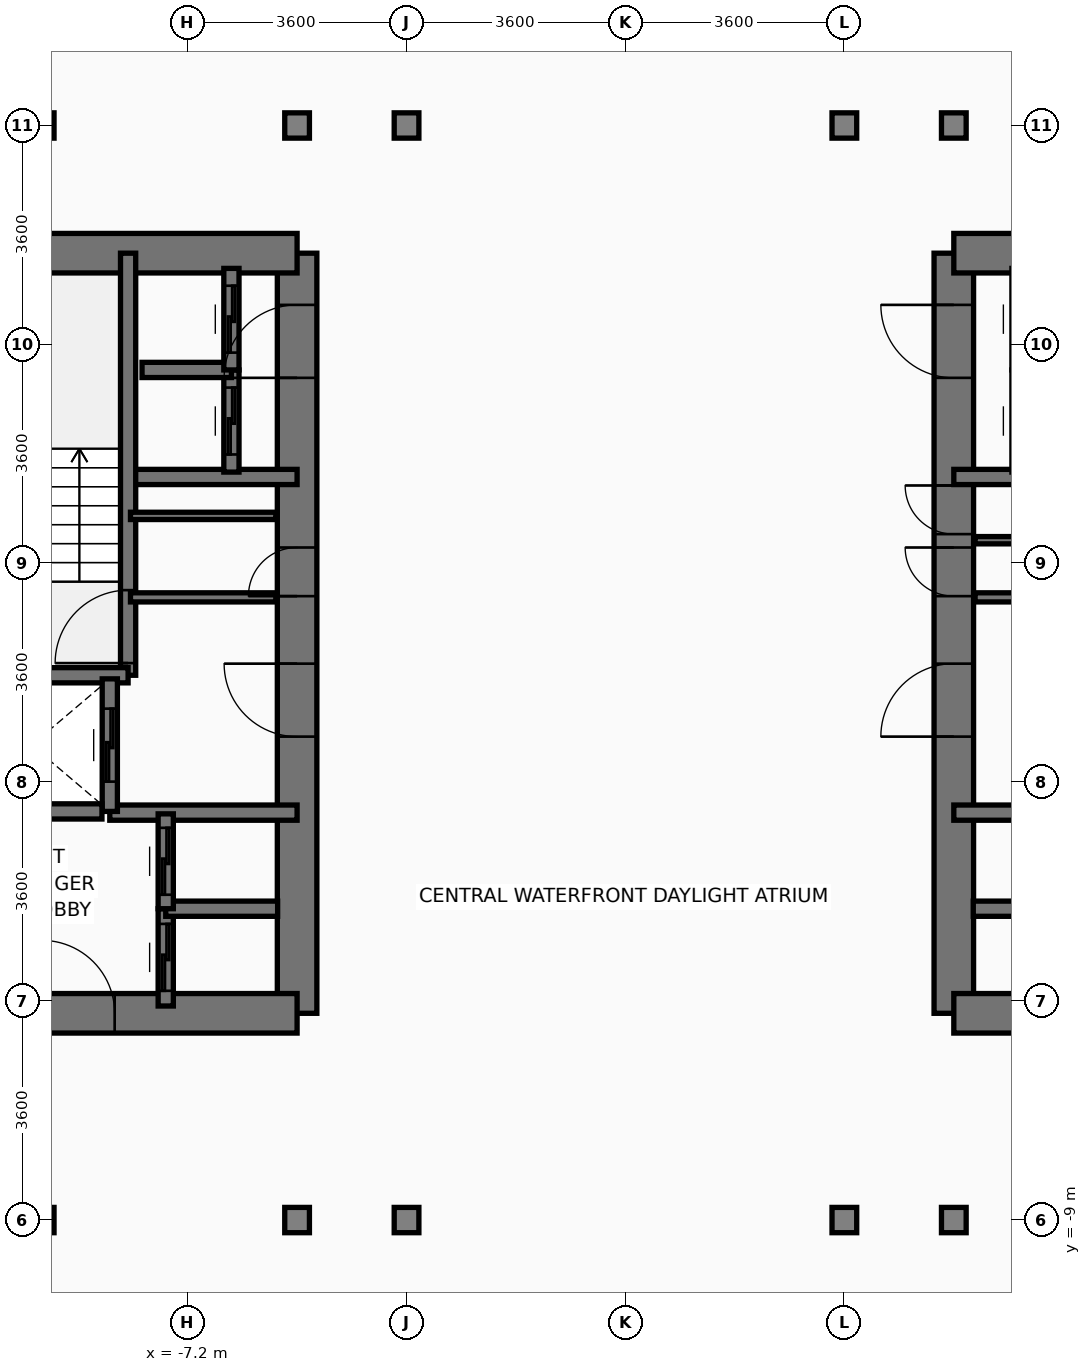
"""IFC4 building model, lengths in metres.
Left out: names, types, materials, properties, quantities, classifications, styles, units other than length and angle.
Written with IfcOpenShell. Run it as: python <this file> out.ifc"""

import sys

from ifc_helpers import new_model, si_unit, direction, frame, frame_2d, origin, origin_2d, place, context, subcontext, project, spatial, rectangle, i_section, extrude, source, transform, mapped, element, fill, save


model = new_model("IFC4")
c1 = context("Model", 3, precision=1e-05, world=origin(), true_north=direction((0.0, 1.0)))
c2 = subcontext(c1, "Body", "Model", "MODEL_VIEW")
j1 = project(units=[si_unit("LENGTHUNIT", "METRE"), si_unit("PLANEANGLEUNIT", "RADIAN")], contexts=[c1])
p1 = place(None, origin())
s1 = spatial("IfcSite", under=j1, at=p1, CompositionType="ELEMENT")
p2 = place(p1, origin())
s2 = spatial("IfcBuilding", under=s1, at=p2, CompositionType="ELEMENT")
p3 = place(p2, origin())
s3 = spatial("IfcBuildingStorey", under=s2, at=p3, CompositionType="ELEMENT", Elevation=0.0)
m1 = source(origin(), c2, "Body", "SweptSolid", [
    extrude(i_section(OverallWidth=0.406, OverallDepth=0.416, WebThickness=0.024, FlangeThickness=0.039, at=origin_2d()), origin(), (0.0, 0.0, 1.0), 5.15),
])
for number, where, z_axis, x_axis in (
    (1, (-9.6, -9.0, 0.0), (0.0, 0.0, 1.0), (1.0, 0.0, 0.0)),
    (2, (-9.6, 9.0, 0.0), (0.0, 0.0, 1.0), (1.0, 0.0, 0.0)),
    (3, (-5.4, -9.0, 0.0), (0.0, 0.0, 1.0), (1.0, 0.0, 0.0)),
    (4, (-5.4, 9.0, 0.0), (0.0, 0.0, 1.0), (1.0, 0.0, 0.0)),
    (5, (-3.6, -9.0, 0.0), (0.0, 0.0, 1.0), (1.0, 0.0, 0.0)),
    (6, (-3.6, 9.0, 0.0), (0.0, 0.0, 1.0), (1.0, 0.0, 0.0)),
    (7, (3.6, -9.0, 0.0), (0.0, 0.0, 1.0), (1.0, 0.0, 0.0)),
    (8, (3.6, 9.0, 0.0), (0.0, 0.0, 1.0), (1.0, 0.0, 0.0)),
    (9, (5.4, -9.0, 0.0), (0.0, 0.0, 1.0), (1.0, 0.0, 0.0)),
    (10, (5.4, 9.0, 0.0), (0.0, 0.0, 1.0), (1.0, 0.0, 0.0)),
):
    element("IfcColumn", number, at=place(p3, frame(where, z_axis=z_axis, x_axis=x_axis)), inside=s3, PredefinedType="COLUMN", context=c2, shape_type="MappedRepresentation", body=[
        mapped(m1, transform((0.0, 0.0, 0.0), x_axis=(1.0, 0.0, 0.0), y_axis=(0.0, 1.0, 0.0), z_axis=(0.0, 0.0, 1.0), scale=1.0)),
    ])
p4 = place(p3, frame((-5.4, -5.6, 0.0), z_axis=(0.0, 0.0, 1.0), x_axis=(0.0, 1.0, 0.0)))
e11 = element("IfcWall", 11, at=p4, inside=s3, PredefinedType="SHEAR", context=c2, shape_type="SweptSolid", body=[
    extrude(rectangle(XDim=12.5, YDim=0.65, at=frame_2d((6.25, 0.0))), origin(), (0.0, 0.0, 1.0), 5.15),
])
p5 = place(p4, frame((4.55, 0.0, 0.0)))
e12 = element("IfcOpeningElement", 12, at=p5, cuts=e11, PredefinedType="OPENING", context=c2, shape_type="SweptSolid", body=[
    extrude(rectangle(XDim=1.2, YDim=2.2, at=frame_2d((0.6, 1.1))), frame((0.0, 0.335, 0.0), z_axis=(0.0, -1.0, 0.0), x_axis=(1.0, 0.0, 0.0)), (0.0, 0.0, 1.0), 0.67),
])
p6 = place(p4, frame((10.45, 0.0, 0.0)))
e13 = element("IfcOpeningElement", 13, at=p6, cuts=e11, PredefinedType="OPENING", context=c2, shape_type="SweptSolid", body=[
    extrude(rectangle(XDim=1.2, YDim=2.2, at=frame_2d((0.6, 1.1))), frame((0.0, 0.335, 0.0), z_axis=(0.0, -1.0, 0.0), x_axis=(1.0, 0.0, 0.0)), (0.0, 0.0, 1.0), 0.67),
])
p7 = place(p4, frame((6.86, 0.0, 0.0)))
e14 = element("IfcOpeningElement", 14, at=p7, cuts=e11, PredefinedType="OPENING", context=c2, shape_type="SweptSolid", body=[
    extrude(rectangle(XDim=0.8, YDim=2.1, at=frame_2d((0.4, 1.05))), frame((0.0, 0.335, 0.0), z_axis=(0.0, -1.0, 0.0), x_axis=(1.0, 0.0, 0.0)), (0.0, 0.0, 1.0), 0.67),
])
p8 = place(p3, frame((-11.381, 6.9, 0.0), z_axis=(0.0, 0.0, 1.0), x_axis=(1.0, 0.0, 0.0)))
e15 = element("IfcWall", 15, at=p8, inside=s3, PredefinedType="SHEAR", context=c2, shape_type="SweptSolid", body=[
    extrude(rectangle(XDim=5.981, YDim=0.65, at=frame_2d((2.991, 0.0))), origin(), (0.0, 0.0, 1.0), 5.15),
])
p9 = place(p3, frame((-13.2, -5.6, 0.0), z_axis=(0.0, 0.0, 1.0), x_axis=(1.0, 0.0, 0.0)))
e16 = element("IfcWall", 16, at=p9, inside=s3, PredefinedType="SHEAR", context=c2, shape_type="SweptSolid", body=[
    extrude(rectangle(XDim=7.8, YDim=0.65, at=frame_2d((3.9, 0.0))), origin(), (0.0, 0.0, 1.0), 5.15),
])
p10 = place(p9, frame((3.6, 0.0, 0.0)))
e17 = element("IfcOpeningElement", 17, at=p10, cuts=e16, PredefinedType="OPENING", context=c2, shape_type="SweptSolid", body=[
    extrude(rectangle(XDim=1.2, YDim=2.2, at=frame_2d((0.6, 1.1))), frame((0.0, 0.335, 0.0), z_axis=(0.0, -1.0, 0.0), x_axis=(1.0, 0.0, 0.0)), (0.0, 0.0, 1.0), 0.67),
])
p11 = place(p3, frame((-8.18, 3.22, 0.0), z_axis=(0.0, 0.0, 1.0), x_axis=(1.0, 0.0, 0.0)))
e18 = element("IfcWall", 18, at=p11, inside=s3, PredefinedType="SOLIDWALL", context=c2, shape_type="SweptSolid", body=[
    extrude(rectangle(XDim=2.78, YDim=0.25, at=frame_2d((1.39, 0.0))), origin(), (0.0, 0.0, 1.0), 5.15),
])
p12 = place(p3, frame((-8.48, -2.3, 0.0), z_axis=(0.0, 0.0, 1.0), x_axis=(1.0, 0.0, 0.0)))
e19 = element("IfcWall", 19, at=p12, inside=s3, PredefinedType="SOLIDWALL", context=c2, shape_type="SweptSolid", body=[
    extrude(rectangle(XDim=3.08, YDim=0.25, at=frame_2d((1.54, 0.0))), origin(), (0.0, 0.0, 1.0), 5.15),
])
p13 = place(p3, frame((-8.179, -0.041, 0.0), z_axis=(0.0, 0.0, 1.0), x_axis=(0.0, 1.0, 0.0)))
e20 = element("IfcWall", 20, at=p13, inside=s3, PredefinedType="SOLIDWALL", context=c2, shape_type="SweptSolid", body=[
    extrude(rectangle(XDim=6.941, YDim=0.25, at=frame_2d((3.47, 0.0))), origin(), (0.0, 0.0, 1.0), 5.15),
])
p14 = place(p13, frame((0.2, 0.0, 0.0)))
e21 = element("IfcOpeningElement", 21, at=p14, cuts=e20, PredefinedType="OPENING", context=c2, shape_type="SweptSolid", body=[
    extrude(rectangle(XDim=1.2, YDim=2.2, at=frame_2d((0.6, 1.1))), frame((0.0, 0.135, 0.0), z_axis=(0.0, -1.0, 0.0), x_axis=(1.0, 0.0, 0.0)), (0.0, 0.0, 1.0), 0.27),
])
p15 = place(p3, frame((-11.381, -0.041, 0.0), z_axis=(0.0, 0.0, 1.0), x_axis=(1.0, 0.0, 0.0)))
e22 = element("IfcWall", 22, at=p15, inside=s3, PredefinedType="SOLIDWALL", context=c2, shape_type="SweptSolid", body=[
    extrude(rectangle(XDim=3.202, YDim=0.25, at=frame_2d((1.601, 0.0))), origin(), (0.0, 0.0, 1.0), 5.15),
])
p16 = place(p3, frame((5.4, -5.6, 0.0), z_axis=(0.0, 0.0, 1.0), x_axis=(0.0, 1.0, 0.0)))
e23 = element("IfcWall", 23, at=p16, inside=s3, PredefinedType="SHEAR", context=c2, shape_type="SweptSolid", body=[
    extrude(rectangle(XDim=12.5, YDim=0.65, at=frame_2d((6.25, 0.0))), origin(), (0.0, 0.0, 1.0), 5.15),
])
p17 = place(p16, frame((4.55, 0.0, 0.0)))
e24 = element("IfcOpeningElement", 24, at=p17, cuts=e23, PredefinedType="OPENING", context=c2, shape_type="SweptSolid", body=[
    extrude(rectangle(XDim=1.2, YDim=2.2, at=frame_2d((0.6, 1.1))), frame((0.0, 0.335, 0.0), z_axis=(0.0, -1.0, 0.0), x_axis=(1.0, 0.0, 0.0)), (0.0, 0.0, 1.0), 0.67),
])
p18 = place(p16, frame((10.45, 0.0, 0.0)))
e25 = element("IfcOpeningElement", 25, at=p18, cuts=e23, PredefinedType="OPENING", context=c2, shape_type="SweptSolid", body=[
    extrude(rectangle(XDim=1.2, YDim=2.2, at=frame_2d((0.6, 1.1))), frame((0.0, 0.335, 0.0), z_axis=(0.0, -1.0, 0.0), x_axis=(1.0, 0.0, 0.0)), (0.0, 0.0, 1.0), 0.67),
])
p19 = place(p16, frame((6.86, 0.0, 0.0)))
e26 = element("IfcOpeningElement", 26, at=p19, cuts=e23, PredefinedType="OPENING", context=c2, shape_type="SweptSolid", body=[
    extrude(rectangle(XDim=0.8, YDim=2.1, at=frame_2d((0.4, 1.05))), frame((0.0, 0.335, 0.0), z_axis=(0.0, -1.0, 0.0), x_axis=(1.0, 0.0, 0.0)), (0.0, 0.0, 1.0), 0.67),
])
p20 = place(p16, frame((7.88, 0.0, 0.0)))
e27 = element("IfcOpeningElement", 27, at=p20, cuts=e23, PredefinedType="OPENING", context=c2, shape_type="SweptSolid", body=[
    extrude(rectangle(XDim=0.8, YDim=2.1, at=frame_2d((0.4, 1.05))), frame((0.0, 0.335, 0.0), z_axis=(0.0, -1.0, 0.0), x_axis=(1.0, 0.0, 0.0)), (0.0, 0.0, 1.0), 0.67),
])
p21 = place(p3, frame((5.4, 6.9, 0.0), z_axis=(0.0, 0.0, 1.0), x_axis=(1.0, 0.0, 0.0)))
e28 = element("IfcWall", 28, at=p21, inside=s3, PredefinedType="SHEAR", context=c2, shape_type="SweptSolid", body=[
    extrude(rectangle(XDim=5.981, YDim=0.65, at=frame_2d((2.991, 0.0))), origin(), (0.0, 0.0, 1.0), 5.15),
])
p22 = place(p3, frame((5.4, -5.6, 0.0), z_axis=(0.0, 0.0, 1.0), x_axis=(1.0, 0.0, 0.0)))
e29 = element("IfcWall", 29, at=p22, inside=s3, PredefinedType="SHEAR", context=c2, shape_type="SweptSolid", body=[
    extrude(rectangle(XDim=7.8, YDim=0.65, at=frame_2d((3.9, 0.0))), origin(), (0.0, 0.0, 1.0), 5.15),
])
p23 = place(p22, frame((3.0, 0.0, 0.0)))
e30 = element("IfcOpeningElement", 30, at=p23, cuts=e29, PredefinedType="OPENING", context=c2, shape_type="SweptSolid", body=[
    extrude(rectangle(XDim=1.2, YDim=2.2, at=frame_2d((0.6, 1.1))), frame((0.0, 0.335, 0.0), z_axis=(0.0, -1.0, 0.0), x_axis=(1.0, 0.0, 0.0)), (0.0, 0.0, 1.0), 0.67),
])
p24 = place(p3, frame((5.4, 3.22, 0.0), z_axis=(0.0, 0.0, 1.0), x_axis=(1.0, 0.0, 0.0)))
e31 = element("IfcWall", 31, at=p24, inside=s3, PredefinedType="SOLIDWALL", context=c2, shape_type="SweptSolid", body=[
    extrude(rectangle(XDim=2.78, YDim=0.25, at=frame_2d((1.39, 0.0))), origin(), (0.0, 0.0, 1.0), 5.15),
])
p25 = place(p3, frame((5.4, -2.3, 0.0), z_axis=(0.0, 0.0, 1.0), x_axis=(1.0, 0.0, 0.0)))
e32 = element("IfcWall", 32, at=p25, inside=s3, PredefinedType="SOLIDWALL", context=c2, shape_type="SweptSolid", body=[
    extrude(rectangle(XDim=3.08, YDim=0.25, at=frame_2d((1.54, 0.0))), origin(), (0.0, 0.0, 1.0), 5.15),
])
p26 = place(p3, frame((-8.48, -2.28, 0.0), z_axis=(0.0, 0.0, 1.0), x_axis=(0.0, 1.0, 0.0)))
e33 = element("IfcWall", 33, at=p26, inside=s3, PredefinedType="SOLIDWALL", context=c2, shape_type="SweptSolid", body=[
    extrude(rectangle(XDim=2.18, YDim=0.25, at=frame_2d((1.09, 0.0))), origin(), (0.0, 0.0, 1.0), 5.15),
])
p27 = place(p26, frame((0.49, 0.0, 0.0)))
e34 = element("IfcOpeningElement", 34, at=p27, cuts=e33, PredefinedType="OPENING", context=c2, shape_type="SweptSolid", body=[
    extrude(rectangle(XDim=1.2, YDim=2.2, at=frame_2d((0.6, 1.1))), frame((0.0, 0.135, 0.0), z_axis=(0.0, -1.0, 0.0), x_axis=(1.0, 0.0, 0.0)), (0.0, 0.0, 1.0), 0.27),
])
p28 = place(p3, frame((-10.921, -2.28, 0.0), z_axis=(0.0, 0.0, 1.0), x_axis=(1.0, 0.0, 0.0)))
e35 = element("IfcWall", 35, at=p28, inside=s3, PredefinedType="SOLIDWALL", context=c2, shape_type="SweptSolid", body=[
    extrude(rectangle(XDim=2.312, YDim=0.25, at=frame_2d((1.156, 0.0))), origin(), (0.0, 0.0, 1.0), 5.15),
])
p29 = place(p3, frame((-7.56, -5.48, 0.0), z_axis=(0.0, 0.0, 1.0), x_axis=(0.0, 1.0, 0.0)))
e36 = element("IfcWall", 36, at=p29, inside=s3, PredefinedType="SOLIDWALL", context=c2, shape_type="SweptSolid", body=[
    extrude(rectangle(XDim=1.6, YDim=0.25, at=frame_2d((0.8, 0.0))), origin(), (0.0, 0.0, 1.0), 5.15),
])
p30 = place(p29, frame((0.25, 0.0, 0.0)))
e37 = element("IfcOpeningElement", 37, at=p30, cuts=e36, PredefinedType="OPENING", context=c2, shape_type="SweptSolid", body=[
    extrude(rectangle(XDim=1.1, YDim=2.2, at=frame_2d((0.55, 1.1))), frame((0.0, 0.135, 0.0), z_axis=(0.0, -1.0, 0.0), x_axis=(1.0, 0.0, 0.0)), (0.0, 0.0, 1.0), 0.27),
])
p31 = place(p3, frame((-7.56, -3.88, 0.0), z_axis=(0.0, 0.0, 1.0), x_axis=(1.0, 0.0, 0.0)))
e38 = element("IfcWall", 38, at=p31, inside=s3, PredefinedType="SOLIDWALL", context=c2, shape_type="SweptSolid", body=[
    extrude(rectangle(XDim=1.84, YDim=0.25, at=frame_2d((0.92, 0.0))), origin(), (0.0, 0.0, 1.0), 5.15),
])
p32 = place(p3, frame((-7.56, -3.88, 0.0), z_axis=(0.0, 0.0, 1.0), x_axis=(0.0, 1.0, 0.0)))
e39 = element("IfcWall", 39, at=p32, inside=s3, PredefinedType="SOLIDWALL", context=c2, shape_type="SweptSolid", body=[
    extrude(rectangle(XDim=1.56, YDim=0.25, at=frame_2d((0.78, 0.0))), origin(), (0.0, 0.0, 1.0), 5.15),
])
p33 = place(p32, frame((0.23, 0.0, 0.0)))
e40 = element("IfcOpeningElement", 40, at=p33, cuts=e39, PredefinedType="OPENING", context=c2, shape_type="SweptSolid", body=[
    extrude(rectangle(XDim=1.1, YDim=2.2, at=frame_2d((0.55, 1.1))), frame((0.0, 0.135, 0.0), z_axis=(0.0, -1.0, 0.0), x_axis=(1.0, 0.0, 0.0)), (0.0, 0.0, 1.0), 0.27),
])
p34 = place(p3, frame((5.72, -3.88, 0.0), z_axis=(0.0, 0.0, 1.0), x_axis=(1.0, 0.0, 0.0)))
e41 = element("IfcWall", 41, at=p34, inside=s3, PredefinedType="SOLIDWALL", context=c2, shape_type="SweptSolid", body=[
    extrude(rectangle(XDim=1.84, YDim=0.25, at=frame_2d((0.92, 0.0))), origin(), (0.0, 0.0, 1.0), 5.15),
])
p35 = place(p3, frame((-6.48, 3.3, 0.0), z_axis=(0.0, 0.0, 1.0), x_axis=(0.0, 1.0, 0.0)))
e42 = element("IfcWall", 42, at=p35, inside=s3, PredefinedType="SOLIDWALL", context=c2, shape_type="SweptSolid", body=[
    extrude(rectangle(XDim=1.68, YDim=0.25, at=frame_2d((0.84, 0.0))), origin(), (0.0, 0.0, 1.0), 5.15),
])
p36 = place(p35, frame((0.29, 0.0, 0.0)))
e43 = element("IfcOpeningElement", 43, at=p36, cuts=e42, PredefinedType="OPENING", context=c2, shape_type="SweptSolid", body=[
    extrude(rectangle(XDim=1.1, YDim=2.2, at=frame_2d((0.55, 1.1))), frame((0.0, 0.135, 0.0), z_axis=(0.0, -1.0, 0.0), x_axis=(1.0, 0.0, 0.0)), (0.0, 0.0, 1.0), 0.27),
])
p37 = place(p3, frame((-7.95, 4.98, 0.0), z_axis=(0.0, 0.0, 1.0), x_axis=(1.0, 0.0, 0.0)))
e44 = element("IfcWall", 44, at=p37, inside=s3, PredefinedType="SOLIDWALL", context=c2, shape_type="SweptSolid", body=[
    extrude(rectangle(XDim=1.47, YDim=0.25, at=frame_2d((0.735, 0.0))), origin(), (0.0, 0.0, 1.0), 5.15),
])
p38 = place(p3, frame((-6.48, 4.98, 0.0), z_axis=(0.0, 0.0, 1.0), x_axis=(0.0, 1.0, 0.0)))
e45 = element("IfcWall", 45, at=p38, inside=s3, PredefinedType="SOLIDWALL", context=c2, shape_type="SweptSolid", body=[
    extrude(rectangle(XDim=1.67, YDim=0.25, at=frame_2d((0.835, 0.0))), origin(), (0.0, 0.0, 1.0), 5.15),
])
p39 = place(p38, frame((0.285, 0.0, 0.0)))
e46 = element("IfcOpeningElement", 46, at=p39, cuts=e45, PredefinedType="OPENING", context=c2, shape_type="SweptSolid", body=[
    extrude(rectangle(XDim=1.1, YDim=2.2, at=frame_2d((0.55, 1.1))), frame((0.0, 0.135, 0.0), z_axis=(0.0, -1.0, 0.0), x_axis=(1.0, 0.0, 0.0)), (0.0, 0.0, 1.0), 0.27),
])
for number, where, z_axis, x_axis in (
    (47, (-8.14, 1.24, 0.0), (0.0, 0.0, 1.0), (1.0, 0.0, 0.0)),
    (48, (5.75, 1.24, 0.0), (0.0, 0.0, 1.0), (1.0, 0.0, 0.0)),
):
    element("IfcWall", number, at=place(p3, frame(where, z_axis=z_axis, x_axis=x_axis)), inside=s3, PredefinedType="PARTITIONING", context=c2, shape_type="SweptSolid", body=[
        extrude(rectangle(XDim=2.39, YDim=0.15, at=frame_2d((1.195, 0.0))), origin(), (0.0, 0.0, 1.0), 4.25),
    ])
for number, where, z_axis, x_axis in (
    (49, (-8.14, 2.58, 0.0), (0.0, 0.0, 1.0), (1.0, 0.0, 0.0)),
    (50, (5.75, 2.18, 0.0), (0.0, 0.0, 1.0), (1.0, 0.0, 0.0)),
):
    element("IfcWall", number, at=place(p3, frame(where, z_axis=z_axis, x_axis=x_axis)), inside=s3, PredefinedType="PARTITIONING", context=c2, shape_type="SweptSolid", body=[
        extrude(rectangle(XDim=2.39, YDim=0.12, at=frame_2d((1.195, 0.0))), origin(), (0.0, 0.0, 1.0), 4.25),
    ])
m2 = source(origin(), c2, "Body", "SweptSolid", [
    extrude(rectangle(XDim=1.2, YDim=2.2, at=frame_2d((0.6, 1.1))), frame((0.0, 0.025, 0.0), z_axis=(0.0, -1.0, 0.0), x_axis=(1.0, 0.0, 0.0)), (0.0, 0.0, 1.0), 0.05),
])
p40 = place(p14, origin())
e51 = element("IfcDoor", 51, at=p40, inside=s3, OperationType="SINGLE_SWING_LEFT", PredefinedType="DOOR", context=c2, shape_type="MappedRepresentation", body=[
    mapped(m2, transform((0.0, 0.0, 0.0), x_axis=(1.0, 0.0, 0.0), y_axis=(0.0, 1.0, 0.0), z_axis=(0.0, 0.0, 1.0), scale=1.0)),
])
fill(e21, e51)
p41 = place(p5, origin())
e52 = element("IfcDoor", 52, at=p41, inside=s3, OperationType="SINGLE_SWING_RIGHT", PredefinedType="DOOR", context=c2, shape_type="MappedRepresentation", body=[
    mapped(m2, transform((0.0, 0.0, 0.0), x_axis=(1.0, 0.0, 0.0), y_axis=(0.0, 1.0, 0.0), z_axis=(0.0, 0.0, 1.0), scale=1.0)),
])
fill(e12, e52)
p42 = place(p6, origin())
e53 = element("IfcDoor", 53, at=p42, inside=s3, OperationType="SINGLE_SWING_LEFT", PredefinedType="DOOR", context=c2, shape_type="MappedRepresentation", body=[
    mapped(m2, transform((0.0, 0.0, 0.0), x_axis=(1.0, 0.0, 0.0), y_axis=(0.0, 1.0, 0.0), z_axis=(0.0, 0.0, 1.0), scale=1.0)),
])
fill(e13, e53)
p43 = place(p10, origin())
e54 = element("IfcDoor", 54, at=p43, inside=s3, OperationType="SINGLE_SWING_LEFT", PredefinedType="DOOR", context=c2, shape_type="MappedRepresentation", body=[
    mapped(m2, transform((0.0, 0.0, 0.0), x_axis=(1.0, 0.0, 0.0), y_axis=(0.0, 1.0, 0.0), z_axis=(0.0, 0.0, 1.0), scale=1.0)),
])
fill(e17, e54)
p44 = place(p17, origin())
e55 = element("IfcDoor", 55, at=p44, inside=s3, OperationType="SINGLE_SWING_LEFT", PredefinedType="DOOR", context=c2, shape_type="MappedRepresentation", body=[
    mapped(m2, transform((0.0, 0.0, 0.0), x_axis=(1.0, 0.0, 0.0), y_axis=(0.0, 1.0, 0.0), z_axis=(0.0, 0.0, 1.0), scale=1.0)),
])
fill(e24, e55)
p45 = place(p18, origin())
e56 = element("IfcDoor", 56, at=p45, inside=s3, OperationType="SINGLE_SWING_RIGHT", PredefinedType="DOOR", context=c2, shape_type="MappedRepresentation", body=[
    mapped(m2, transform((0.0, 0.0, 0.0), x_axis=(1.0, 0.0, 0.0), y_axis=(0.0, 1.0, 0.0), z_axis=(0.0, 0.0, 1.0), scale=1.0)),
])
fill(e25, e56)
m3 = source(origin(), c2, "Body", "SweptSolid", [
    extrude(rectangle(XDim=0.8, YDim=2.1, at=frame_2d((0.4, 1.05))), frame((0.0, 0.025, 0.0), z_axis=(0.0, -1.0, 0.0), x_axis=(1.0, 0.0, 0.0)), (0.0, 0.0, 1.0), 0.05),
])
p46 = place(p7, origin())
e57 = element("IfcDoor", 57, at=p46, inside=s3, OperationType="SINGLE_SWING_LEFT", PredefinedType="DOOR", context=c2, shape_type="MappedRepresentation", body=[
    mapped(m3, transform((0.0, 0.0, 0.0), x_axis=(1.0, 0.0, 0.0), y_axis=(0.0, 1.0, 0.0), z_axis=(0.0, 0.0, 1.0), scale=1.0)),
])
fill(e14, e57)
p47 = place(p19, origin())
e58 = element("IfcDoor", 58, at=p47, inside=s3, OperationType="SINGLE_SWING_RIGHT", PredefinedType="DOOR", context=c2, shape_type="MappedRepresentation", body=[
    mapped(m3, transform((0.0, 0.0, 0.0), x_axis=(1.0, 0.0, 0.0), y_axis=(0.0, 1.0, 0.0), z_axis=(0.0, 0.0, 1.0), scale=1.0)),
])
fill(e26, e58)
p48 = place(p20, origin())
e59 = element("IfcDoor", 59, at=p48, inside=s3, OperationType="SINGLE_SWING_RIGHT", PredefinedType="DOOR", context=c2, shape_type="MappedRepresentation", body=[
    mapped(m3, transform((0.0, 0.0, 0.0), x_axis=(1.0, 0.0, 0.0), y_axis=(0.0, 1.0, 0.0), z_axis=(0.0, 0.0, 1.0), scale=1.0)),
])
fill(e27, e59)
p49 = place(p27, origin())
e60 = element("IfcDoor", 60, at=p49, inside=s3, OperationType="SLIDING_TO_RIGHT", PredefinedType="DOOR", context=c2, shape_type="MappedRepresentation", body=[
    mapped(m2, transform((0.0, 0.0, 0.0), x_axis=(1.0, 0.0, 0.0), y_axis=(0.0, 1.0, 0.0), z_axis=(0.0, 0.0, 1.0), scale=1.0)),
])
fill(e34, e60)
m4 = source(origin(), c2, "Body", "SweptSolid", [
    extrude(rectangle(XDim=1.1, YDim=2.2, at=frame_2d((0.55, 1.1))), frame((0.0, 0.025, 0.0), z_axis=(0.0, -1.0, 0.0), x_axis=(1.0, 0.0, 0.0)), (0.0, 0.0, 1.0), 0.05),
])
p50 = place(p30, origin())
e61 = element("IfcDoor", 61, at=p50, inside=s3, OperationType="SLIDING_TO_LEFT", PredefinedType="DOOR", context=c2, shape_type="MappedRepresentation", body=[
    mapped(m4, transform((0.0, 0.0, 0.0), x_axis=(1.0, 0.0, 0.0), y_axis=(0.0, 1.0, 0.0), z_axis=(0.0, 0.0, 1.0), scale=1.0)),
])
fill(e37, e61)
p51 = place(p33, origin())
e62 = element("IfcDoor", 62, at=p51, inside=s3, OperationType="SLIDING_TO_LEFT", PredefinedType="DOOR", context=c2, shape_type="MappedRepresentation", body=[
    mapped(m4, transform((0.0, 0.0, 0.0), x_axis=(1.0, 0.0, 0.0), y_axis=(0.0, 1.0, 0.0), z_axis=(0.0, 0.0, 1.0), scale=1.0)),
])
fill(e40, e62)
p52 = place(p36, origin())
e63 = element("IfcDoor", 63, at=p52, inside=s3, OperationType="SLIDING_TO_LEFT", PredefinedType="DOOR", context=c2, shape_type="MappedRepresentation", body=[
    mapped(m4, transform((0.0, 0.0, 0.0), x_axis=(1.0, 0.0, 0.0), y_axis=(0.0, 1.0, 0.0), z_axis=(0.0, 0.0, 1.0), scale=1.0)),
])
fill(e43, e63)
p53 = place(p39, origin())
e64 = element("IfcDoor", 64, at=p53, inside=s3, OperationType="SLIDING_TO_LEFT", PredefinedType="DOOR", context=c2, shape_type="MappedRepresentation", body=[
    mapped(m4, transform((0.0, 0.0, 0.0), x_axis=(1.0, 0.0, 0.0), y_axis=(0.0, 1.0, 0.0), z_axis=(0.0, 0.0, 1.0), scale=1.0)),
])
fill(e46, e64)
save(model, sys.argv[1])
